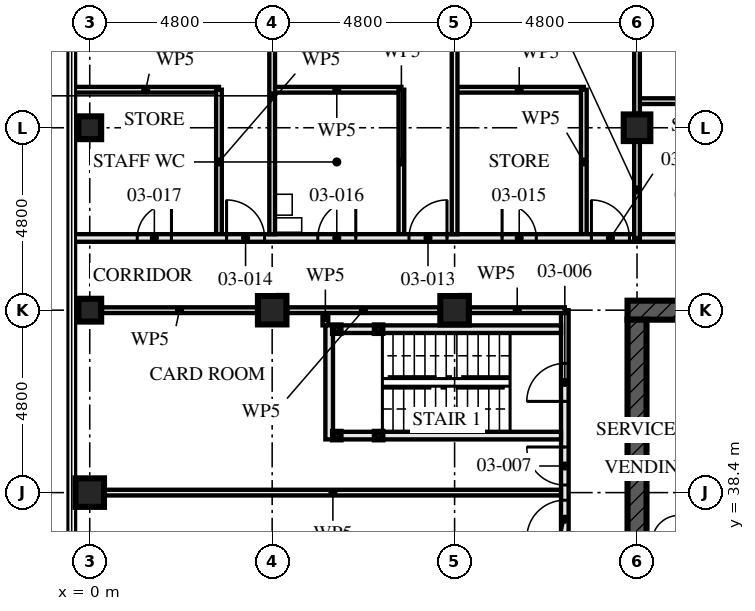
"""IFC4 building model, lengths in metres.
Left out: names, types, materials, properties, quantities, classifications, styles, units other than length and angle.
Written with IfcOpenShell. Run it as: python <this file> out.ifc"""

import sys

from ifc_helpers import new_model, si_unit, direction, frame, frame_2d, origin, origin_2d, place, context, subcontext, project, spatial, rectangle, hollow_rectangle, extrude, element, fill, save


model = new_model("IFC4")
c1 = context("Model", 3, precision=1e-05, world=origin(), true_north=direction((0.0, 1.0)))
c2 = subcontext(c1, "Body", "Model", "MODEL_VIEW")
j1 = project(units=[si_unit("LENGTHUNIT", "METRE"), si_unit("PLANEANGLEUNIT", "RADIAN")], contexts=[c1])
p1 = place(None, origin())
s1 = spatial("IfcSite", under=j1, at=p1, CompositionType="ELEMENT")
p2 = place(p1, origin())
s2 = spatial("IfcBuilding", under=s1, at=p2, CompositionType="ELEMENT")
p3 = place(p2, frame((0.0, 0.0, 13.5)))
s3 = spatial("IfcBuildingStorey", under=s2, at=p3, CompositionType="ELEMENT", Elevation=13.5)
p4 = place(p3, frame((0.0, 38.4, 0.0), z_axis=(0.0, 0.0, 1.0), x_axis=(1.0, 0.0, 0.0)))
e1 = element("IfcColumn", 1, at=p4, inside=s3, PredefinedType="COLUMN", context=c2, shape_type="SweptSolid", body=[
    extrude(hollow_rectangle(XDim=0.75, YDim=0.75, WallThickness=0.08, at=origin_2d()), origin(), (0.0, 0.0, 1.0), 4.5),
])
for number, where, z_axis, x_axis in (
    (2, (0.0, 43.2, 0.0), (0.0, 0.0, 1.0), (0.0, 1.0, 0.0)),
    (3, (0.0, 48.0, 0.0), (0.0, 0.0, 1.0), (1.0, 0.0, 0.0)),
):
    element("IfcColumn", number, at=place(p3, frame(where, z_axis=z_axis, x_axis=x_axis)), inside=s3, PredefinedType="COLUMN", context=c2, shape_type="SweptSolid", body=[
        extrude(hollow_rectangle(XDim=0.6, YDim=0.6, WallThickness=0.08, at=origin_2d()), origin(), (0.0, 0.0, 1.0), 4.5),
    ])
for number, where, z_axis, x_axis in (
    (4, (4.8, 43.2, 0.0), (0.0, 0.0, 1.0), (0.0, 1.0, 0.0)),
    (5, (9.6, 43.2, 0.0), (0.0, 0.0, 1.0), (0.0, 1.0, 0.0)),
):
    element("IfcColumn", number, at=place(p3, frame(where, z_axis=z_axis, x_axis=x_axis)), inside=s3, PredefinedType="COLUMN", context=c2, shape_type="SweptSolid", body=[
        extrude(hollow_rectangle(XDim=0.75, YDim=0.75, WallThickness=0.08, at=origin_2d()), origin(), (0.0, 0.0, 1.0), 4.5),
    ])
p5 = place(p3, frame((14.4, 48.0, 0.0), z_axis=(0.0, 0.0, 1.0), x_axis=(1.0, 0.0, 0.0)))
e6 = element("IfcColumn", 6, at=p5, inside=s3, PredefinedType="COLUMN", context=c2, shape_type="SweptSolid", body=[
    extrude(hollow_rectangle(XDim=0.7, YDim=0.7, WallThickness=0.06, at=origin_2d()), origin(), (0.0, 0.0, 1.0), 4.5),
])
p6 = place(p3, frame((29.05, 43.2, -0.17), z_axis=(0.0, 0.0, 1.0), x_axis=(-1.0, 0.0, 0.0)))
e7 = element("IfcWall", 7, at=p6, inside=s3, PredefinedType="SHEAR", context=c2, shape_type="SweptSolid", body=[
    extrude(rectangle(XDim=14.9, YDim=0.5, at=frame_2d((7.45, 0.0))), origin(), (0.0, 0.0, 1.0), 4.5),
])
p7 = place(p6, frame((6.85, 0.0, 0.17)))
e8 = element("IfcOpeningElement", 8, at=p7, cuts=e7, PredefinedType="OPENING", context=c2, shape_type="SweptSolid", body=[
    extrude(rectangle(XDim=1.2, YDim=2.1, at=frame_2d((0.6, 1.05))), frame((0.0, 0.26, 0.0), z_axis=(0.0, -1.0, 0.0), x_axis=(1.0, 0.0, 0.0)), (0.0, 0.0, 1.0), 0.521),
])
p8 = place(p3, frame((14.4, 42.95, -0.17), z_axis=(0.0, 0.0, 1.0), x_axis=(0.0, -1.0, 0.0)))
e9 = element("IfcWall", 9, at=p8, inside=s3, PredefinedType="SHEAR", context=c2, shape_type="SweptSolid", body=[
    extrude(rectangle(XDim=13.9, YDim=0.5, at=frame_2d((6.95, 0.0))), origin(), (0.0, 0.0, 1.0), 4.5),
])
p9 = place(p8, frame((6.35, 0.0, 0.17)))
e10 = element("IfcOpeningElement", 10, at=p9, cuts=e9, PredefinedType="OPENING", context=c2, shape_type="SweptSolid", body=[
    extrude(rectangle(XDim=1.2, YDim=2.1, at=frame_2d((0.6, 1.05))), frame((0.0, 0.26, 0.0), z_axis=(0.0, -1.0, 0.0), x_axis=(1.0, 0.0, 0.0)), (0.0, 0.0, 1.0), 0.521),
])
for number, where, z_axis, x_axis in (
    (11, (6.5, 42.7, 0.0), (0.0, 0.0, 1.0), (1.0, 0.0, 0.0)),
    (12, (6.5, 39.9, 0.0), (0.0, 0.0, 1.0), (1.0, 0.0, 0.0)),
    (13, (7.6, 42.7, 0.0), (0.0, 0.0, 1.0), (1.0, 0.0, 0.0)),
    (14, (7.6, 39.9, 0.0), (0.0, 0.0, 1.0), (1.0, 0.0, 0.0)),
):
    element("IfcColumn", number, at=place(p3, frame(where, z_axis=z_axis, x_axis=x_axis)), inside=s3, PredefinedType="COLUMN", context=c2, shape_type="SweptSolid", body=[
        extrude(hollow_rectangle(XDim=0.2, YDim=0.2, WallThickness=0.008, at=origin_2d()), origin(), (0.0, 0.0, 1.0), 4.33),
    ])
p10 = place(p3, frame((6.6, 42.7, 0.0), z_axis=(0.0, 0.0, 1.0), x_axis=(1.0, 0.0, 0.0)))
e15 = element("IfcWall", 15, at=p10, inside=s3, PredefinedType="SOLIDWALL", context=c2, shape_type="SweptSolid", body=[
    extrude(rectangle(XDim=0.9, YDim=0.2, at=frame_2d((0.45, 0.0))), origin(), (0.0, 0.0, 1.0), 3.99),
])
p11 = place(p3, frame((7.7, 42.7, 0.0), z_axis=(0.0, 0.0, 1.0), x_axis=(1.0, 0.0, 0.0)))
e16 = element("IfcWall", 16, at=p11, inside=s3, PredefinedType="SOLIDWALL", context=c2, shape_type="SweptSolid", body=[
    extrude(rectangle(XDim=4.7, YDim=0.2, at=frame_2d((2.35, 0.0))), origin(), (0.0, 0.0, 1.0), 3.99),
])
p12 = place(p3, frame((6.6, 39.9, 0.0), z_axis=(0.0, 0.0, 1.0), x_axis=(1.0, 0.0, 0.0)))
e17 = element("IfcWall", 17, at=p12, inside=s3, PredefinedType="SOLIDWALL", context=c2, shape_type="SweptSolid", body=[
    extrude(rectangle(XDim=0.9, YDim=0.2, at=frame_2d((0.45, 0.0))), origin(), (0.0, 0.0, 1.0), 3.99),
])
p13 = place(p3, frame((7.7, 39.9, 0.0), z_axis=(0.0, 0.0, 1.0), x_axis=(1.0, 0.0, 0.0)))
e18 = element("IfcWall", 18, at=p13, inside=s3, PredefinedType="SOLIDWALL", context=c2, shape_type="SweptSolid", body=[
    extrude(rectangle(XDim=4.7, YDim=0.2, at=frame_2d((2.35, 0.0))), origin(), (0.0, 0.0, 1.0), 3.99),
])
p14 = place(p3, frame((6.3, 42.8, 0.0), z_axis=(0.0, 0.0, 1.0), x_axis=(0.0, -1.0, 0.0)))
e19 = element("IfcWall", 19, at=p14, inside=s3, PredefinedType="SOLIDWALL", context=c2, shape_type="SweptSolid", body=[
    extrude(rectangle(XDim=3.0, YDim=0.2, at=frame_2d((1.5, 0.0))), origin(), (0.0, 0.0, 1.0), 4.33),
])
p15 = place(p3, frame((0.395, 38.4, 0.0), z_axis=(0.0, 0.0, 1.0), x_axis=(1.0, 0.0, 0.0)))
e20 = element("IfcWall", 20, at=p15, inside=s3, PredefinedType="PARTITIONING", context=c2, shape_type="SweptSolid", body=[
    extrude(rectangle(XDim=12.005, YDim=0.15, at=frame_2d((6.002, 0.0))), origin(), (0.0, 0.0, 1.0), 3.55),
])
p16 = place(p3, frame((6.2, 43.2, 0.0), z_axis=(0.0, 0.0, 1.0), x_axis=(0.0, -1.0, 0.0)))
e21 = element("IfcWall", 21, at=p16, inside=s3, PredefinedType="PARTITIONING", context=c2, shape_type="SweptSolid", body=[
    extrude(rectangle(XDim=0.4, YDim=0.15, at=frame_2d((0.2, 0.0))), origin(), (0.0, 0.0, 1.0), 4.33),
])
p17 = place(p3, frame((12.5, 43.2, 0.0), z_axis=(0.0, 0.0, 1.0), x_axis=(0.0, -1.0, 0.0)))
e22 = element("IfcWall", 22, at=p17, inside=s3, PredefinedType="PARTITIONING", context=c2, shape_type="SweptSolid", body=[
    extrude(rectangle(XDim=14.4, YDim=0.2, at=frame_2d((7.2, 0.0))), origin(), (0.0, 0.0, 1.0), 3.55),
])
p18 = place(p17, frame((1.4, 0.0, 0.0)))
e23 = element("IfcOpeningElement", 23, at=p18, cuts=e22, PredefinedType="OPENING", context=c2, shape_type="SweptSolid", body=[
    extrude(rectangle(XDim=1.0, YDim=2.1, at=frame_2d((0.5, 1.05))), frame((0.0, 0.111, 0.0), z_axis=(0.0, -1.0, 0.0), x_axis=(1.0, 0.0, 0.0)), (0.0, 0.0, 1.0), 0.221),
])
p19 = place(p17, frame((3.6, 0.0, 0.0)))
e24 = element("IfcOpeningElement", 24, at=p19, cuts=e22, PredefinedType="OPENING", context=c2, shape_type="SweptSolid", body=[
    extrude(rectangle(XDim=1.0, YDim=2.4, at=frame_2d((0.5, 1.2))), frame((0.0, 0.111, 0.0), z_axis=(0.0, -1.0, 0.0), x_axis=(1.0, 0.0, 0.0)), (0.0, 0.0, 1.0), 0.221),
])
p20 = place(p17, frame((5.0, 0.0, 0.0)))
e25 = element("IfcOpeningElement", 25, at=p20, cuts=e22, PredefinedType="OPENING", context=c2, shape_type="SweptSolid", body=[
    extrude(rectangle(XDim=1.0, YDim=2.4, at=frame_2d((0.5, 1.2))), frame((0.0, 0.111, 0.0), z_axis=(0.0, -1.0, 0.0), x_axis=(1.0, 0.0, 0.0)), (0.0, 0.0, 1.0), 0.221),
])
p21 = place(p17, frame((9.8, 0.0, 0.0)))
e26 = element("IfcOpeningElement", 26, at=p21, cuts=e22, PredefinedType="OPENING", context=c2, shape_type="SweptSolid", body=[
    extrude(rectangle(XDim=1.0, YDim=2.4, at=frame_2d((0.5, 1.2))), frame((0.0, 0.111, 0.0), z_axis=(0.0, -1.0, 0.0), x_axis=(1.0, 0.0, 0.0)), (0.0, 0.0, 1.0), 0.221),
])
p22 = place(p17, frame((7.45, 0.0, 0.0)))
e27 = element("IfcOpeningElement", 27, at=p22, cuts=e22, PredefinedType="OPENING", context=c2, shape_type="SweptSolid", body=[
    extrude(rectangle(XDim=0.9, YDim=2.1, at=frame_2d((0.45, 1.05))), frame((0.0, 0.111, 0.0), z_axis=(0.0, -1.0, 0.0), x_axis=(1.0, 0.0, 0.0)), (0.0, 0.0, 1.0), 0.221),
])
p23 = place(p17, frame((12.2, 0.0, 0.0)))
e28 = element("IfcOpeningElement", 28, at=p23, cuts=e22, PredefinedType="OPENING", context=c2, shape_type="SweptSolid", body=[
    extrude(rectangle(XDim=1.0, YDim=2.1, at=frame_2d((0.5, 1.05))), frame((0.0, 0.111, 0.0), z_axis=(0.0, -1.0, 0.0), x_axis=(1.0, 0.0, 0.0)), (0.0, 0.0, 1.0), 0.221),
])
p24 = place(p3, frame((13.0, 49.0, 0.0), z_axis=(0.0, 0.0, 1.0), x_axis=(0.0, -1.0, 0.0)))
e29 = element("IfcWall", 29, at=p24, inside=s3, PredefinedType="PARTITIONING", context=c2, shape_type="SweptSolid", body=[
    extrude(rectangle(XDim=3.8, YDim=0.15, at=frame_2d((1.9, 0.0))), origin(), (0.0, 0.0, 1.0), 3.55),
])
p25 = place(p3, frame((13.0, 49.0, 0.0), z_axis=(0.0, 0.0, 1.0), x_axis=(-1.0, 0.0, 0.0)))
e30 = element("IfcWall", 30, at=p25, inside=s3, PredefinedType="PARTITIONING", context=c2, shape_type="SweptSolid", body=[
    extrude(rectangle(XDim=3.4, YDim=0.15, at=frame_2d((1.7, 0.0))), origin(), (0.0, 0.0, 1.0), 4.33),
])
p26 = place(p3, frame((8.2, 49.0, 0.0), z_axis=(0.0, 0.0, 1.0), x_axis=(0.0, -1.0, 0.0)))
e31 = element("IfcWall", 31, at=p26, inside=s3, PredefinedType="PARTITIONING", context=c2, shape_type="SweptSolid", body=[
    extrude(rectangle(XDim=3.8, YDim=0.15, at=frame_2d((1.9, 0.0))), origin(), (0.0, 0.0, 1.0), 3.55),
])
p27 = place(p3, frame((8.2, 49.0, 0.0), z_axis=(0.0, 0.0, 1.0), x_axis=(-1.0, 0.0, 0.0)))
e32 = element("IfcWall", 32, at=p27, inside=s3, PredefinedType="PARTITIONING", context=c2, shape_type="SweptSolid", body=[
    extrude(rectangle(XDim=3.4, YDim=0.15, at=frame_2d((1.7, 0.0))), origin(), (0.0, 0.0, 1.0), 4.33),
])
p28 = place(p3, frame((3.4, 49.0, 0.0), z_axis=(0.0, 0.0, 1.0), x_axis=(0.0, -1.0, 0.0)))
e33 = element("IfcWall", 33, at=p28, inside=s3, PredefinedType="PARTITIONING", context=c2, shape_type="SweptSolid", body=[
    extrude(rectangle(XDim=3.8, YDim=0.15, at=frame_2d((1.9, 0.0))), origin(), (0.0, 0.0, 1.0), 3.55),
])
p29 = place(p3, frame((3.4, 49.0, 0.0), z_axis=(0.0, 0.0, 1.0), x_axis=(-1.0, 0.0, 0.0)))
e34 = element("IfcWall", 34, at=p29, inside=s3, PredefinedType="PARTITIONING", context=c2, shape_type="SweptSolid", body=[
    extrude(rectangle(XDim=3.855, YDim=0.15, at=frame_2d((1.927, 0.0))), origin(), (0.0, 0.0, 1.0), 3.32),
])
p30 = place(p3, frame((9.6, 57.28, 0.0), z_axis=(0.0, 0.0, 1.0), x_axis=(0.0, -1.0, 0.0)))
e35 = element("IfcWall", 35, at=p30, inside=s3, PredefinedType="PARTITIONING", context=c2, shape_type="SweptSolid", body=[
    extrude(rectangle(XDim=12.08, YDim=0.15, at=frame_2d((6.04, 0.0))), origin(), (0.0, 0.0, 1.0), 3.55),
])
p31 = place(p3, frame((4.8, 52.48, 0.0), z_axis=(0.0, 0.0, 1.0), x_axis=(0.0, -1.0, 0.0)))
e36 = element("IfcWall", 36, at=p31, inside=s3, PredefinedType="PARTITIONING", context=c2, shape_type="SweptSolid", body=[
    extrude(rectangle(XDim=7.28, YDim=0.15, at=frame_2d((3.64, 0.0))), origin(), (0.0, 0.0, 1.0), 3.55),
])
p32 = place(p3, frame((14.4, 45.1, 0.0), z_axis=(0.0, 0.0, 1.0), x_axis=(-1.0, 0.0, 0.0)))
e37 = element("IfcWall", 37, at=p32, inside=s3, PredefinedType="PARTITIONING", context=c2, shape_type="SweptSolid", body=[
    extrude(rectangle(XDim=14.855, YDim=0.2, at=frame_2d((7.427, 0.0))), origin(), (0.0, 0.0, 1.0), 3.32),
])
p33 = place(p32, frame((0.2, 0.0, 0.0)))
e38 = element("IfcOpeningElement", 38, at=p33, cuts=e37, PredefinedType="OPENING", context=c2, shape_type="SweptSolid", body=[
    extrude(rectangle(XDim=1.0, YDim=2.4, at=frame_2d((0.5, 1.2))), frame((0.0, 0.111, 0.0), z_axis=(0.0, -1.0, 0.0), x_axis=(1.0, 0.0, 0.0)), (0.0, 0.0, 1.0), 0.221),
])
p34 = place(p32, frame((5.0, 0.0, 0.0)))
e39 = element("IfcOpeningElement", 39, at=p34, cuts=e37, PredefinedType="OPENING", context=c2, shape_type="SweptSolid", body=[
    extrude(rectangle(XDim=1.0, YDim=2.4, at=frame_2d((0.5, 1.2))), frame((0.0, 0.111, 0.0), z_axis=(0.0, -1.0, 0.0), x_axis=(1.0, 0.0, 0.0)), (0.0, 0.0, 1.0), 0.221),
])
p35 = place(p32, frame((9.8, 0.0, 0.0)))
e40 = element("IfcOpeningElement", 40, at=p35, cuts=e37, PredefinedType="OPENING", context=c2, shape_type="SweptSolid", body=[
    extrude(rectangle(XDim=1.0, YDim=2.4, at=frame_2d((0.5, 1.2))), frame((0.0, 0.111, 0.0), z_axis=(0.0, -1.0, 0.0), x_axis=(1.0, 0.0, 0.0)), (0.0, 0.0, 1.0), 0.221),
])
p36 = place(p32, frame((2.65, 0.0, 0.0)))
e41 = element("IfcOpeningElement", 41, at=p36, cuts=e37, PredefinedType="OPENING", context=c2, shape_type="SweptSolid", body=[
    extrude(rectangle(XDim=0.9, YDim=2.1, at=frame_2d((0.45, 1.05))), frame((0.0, 0.111, 0.0), z_axis=(0.0, -1.0, 0.0), x_axis=(1.0, 0.0, 0.0)), (0.0, 0.0, 1.0), 0.221),
])
p37 = place(p32, frame((7.4, 0.0, 0.0)))
e42 = element("IfcOpeningElement", 42, at=p37, cuts=e37, PredefinedType="OPENING", context=c2, shape_type="SweptSolid", body=[
    extrude(rectangle(XDim=1.0, YDim=2.1, at=frame_2d((0.5, 1.05))), frame((0.0, 0.111, 0.0), z_axis=(0.0, -1.0, 0.0), x_axis=(1.0, 0.0, 0.0)), (0.0, 0.0, 1.0), 0.221),
])
p38 = place(p32, frame((12.25, 0.0, 0.0)))
e43 = element("IfcOpeningElement", 43, at=p38, cuts=e37, PredefinedType="OPENING", context=c2, shape_type="SweptSolid", body=[
    extrude(rectangle(XDim=0.9, YDim=2.1, at=frame_2d((0.45, 1.05))), frame((0.0, 0.111, 0.0), z_axis=(0.0, -1.0, 0.0), x_axis=(1.0, 0.0, 0.0)), (0.0, 0.0, 1.0), 0.221),
])
p39 = place(p3, frame((17.8, 48.7, 0.0), z_axis=(0.0, 0.0, 1.0), x_axis=(-1.0, 0.0, 0.0)))
e44 = element("IfcWall", 44, at=p39, inside=s3, PredefinedType="PARTITIONING", context=c2, shape_type="SweptSolid", body=[
    extrude(rectangle(XDim=3.4, YDim=0.15, at=frame_2d((1.7, 0.0))), origin(), (0.0, 0.0, 1.0), 4.33),
])
p40 = place(p3, frame((28.8, 45.1, 0.0), z_axis=(0.0, 0.0, 1.0), x_axis=(-1.0, 0.0, 0.0)))
e45 = element("IfcWall", 45, at=p40, inside=s3, PredefinedType="PARTITIONING", context=c2, shape_type="SweptSolid", body=[
    extrude(rectangle(XDim=14.4, YDim=0.2, at=frame_2d((7.2, 0.0))), origin(), (0.0, 0.0, 1.0), 4.33),
])
p41 = place(p40, frame((0.2, 0.0, 0.0)))
e46 = element("IfcOpeningElement", 46, at=p41, cuts=e45, PredefinedType="OPENING", context=c2, shape_type="SweptSolid", body=[
    extrude(rectangle(XDim=1.0, YDim=2.4, at=frame_2d((0.5, 1.2))), frame((0.0, 0.111, 0.0), z_axis=(0.0, -1.0, 0.0), x_axis=(1.0, 0.0, 0.0)), (0.0, 0.0, 1.0), 0.221),
])
p42 = place(p40, frame((5.0, 0.0, 0.0)))
e47 = element("IfcOpeningElement", 47, at=p42, cuts=e45, PredefinedType="OPENING", context=c2, shape_type="SweptSolid", body=[
    extrude(rectangle(XDim=1.0, YDim=2.4, at=frame_2d((0.5, 1.2))), frame((0.0, 0.111, 0.0), z_axis=(0.0, -1.0, 0.0), x_axis=(1.0, 0.0, 0.0)), (0.0, 0.0, 1.0), 0.221),
])
p43 = place(p40, frame((9.8, 0.0, 0.0)))
e48 = element("IfcOpeningElement", 48, at=p43, cuts=e45, PredefinedType="OPENING", context=c2, shape_type="SweptSolid", body=[
    extrude(rectangle(XDim=1.0, YDim=2.4, at=frame_2d((0.5, 1.2))), frame((0.0, 0.111, 0.0), z_axis=(0.0, -1.0, 0.0), x_axis=(1.0, 0.0, 0.0)), (0.0, 0.0, 1.0), 0.221),
])
p44 = place(p40, frame((2.65, 0.0, 0.0)))
e49 = element("IfcOpeningElement", 49, at=p44, cuts=e45, PredefinedType="OPENING", context=c2, shape_type="SweptSolid", body=[
    extrude(rectangle(XDim=0.9, YDim=2.1, at=frame_2d((0.45, 1.05))), frame((0.0, 0.111, 0.0), z_axis=(0.0, -1.0, 0.0), x_axis=(1.0, 0.0, 0.0)), (0.0, 0.0, 1.0), 0.221),
])
p45 = place(p40, frame((7.4, 0.0, 0.0)))
e50 = element("IfcOpeningElement", 50, at=p45, cuts=e45, PredefinedType="OPENING", context=c2, shape_type="SweptSolid", body=[
    extrude(rectangle(XDim=1.0, YDim=2.1, at=frame_2d((0.5, 1.05))), frame((0.0, 0.111, 0.0), z_axis=(0.0, -1.0, 0.0), x_axis=(1.0, 0.0, 0.0)), (0.0, 0.0, 1.0), 0.221),
])
p46 = place(p40, frame((12.25, 0.0, 0.0)))
e51 = element("IfcOpeningElement", 51, at=p46, cuts=e45, PredefinedType="OPENING", context=c2, shape_type="SweptSolid", body=[
    extrude(rectangle(XDim=0.9, YDim=2.1, at=frame_2d((0.45, 1.05))), frame((0.0, 0.111, 0.0), z_axis=(0.0, -1.0, 0.0), x_axis=(1.0, 0.0, 0.0)), (0.0, 0.0, 1.0), 0.221),
])
p47 = place(p3, frame((12.5, 43.2, 0.0), z_axis=(0.0, 0.0, 1.0), x_axis=(-1.0, 0.0, 0.0)))
e52 = element("IfcWall", 52, at=p47, inside=s3, PredefinedType="PARTITIONING", context=c2, shape_type="SweptSolid", body=[
    extrude(rectangle(XDim=2.505, YDim=0.15, at=frame_2d((1.252, 0.0))), origin(), (0.0, 0.0, 1.0), 3.32),
])
p48 = place(p3, frame((9.205, 43.2, 0.0), z_axis=(0.0, 0.0, 1.0), x_axis=(-1.0, 0.0, 0.0)))
e53 = element("IfcWall", 53, at=p48, inside=s3, PredefinedType="PARTITIONING", context=c2, shape_type="SweptSolid", body=[
    extrude(rectangle(XDim=4.01, YDim=0.15, at=frame_2d((2.005, 0.0))), origin(), (0.0, 0.0, 1.0), 3.32),
])
p49 = place(p3, frame((4.405, 43.2, 0.0), z_axis=(0.0, 0.0, 1.0), x_axis=(-1.0, 0.0, 0.0)))
e54 = element("IfcWall", 54, at=p49, inside=s3, PredefinedType="PARTITIONING", context=c2, shape_type="SweptSolid", body=[
    extrude(rectangle(XDim=4.085, YDim=0.15, at=frame_2d((2.042, 0.0))), origin(), (0.0, 0.0, 1.0), 3.32),
])
p50 = place(p3, frame((14.4, 45.1, 0.0), z_axis=(0.0, 0.0, 1.0), x_axis=(0.0, 1.0, 0.0)))
e55 = element("IfcWall", 55, at=p50, inside=s3, PredefinedType="PARTITIONING", context=c2, shape_type="SweptSolid", body=[
    extrude(rectangle(XDim=2.53, YDim=0.15, at=frame_2d((1.265, 0.0))), origin(), (0.0, 0.0, 1.0), 3.32),
])
p51 = place(p3, frame((14.4, 48.37, 0.0), z_axis=(0.0, 0.0, 1.0), x_axis=(0.0, 1.0, 0.0)))
e56 = element("IfcWall", 56, at=p51, inside=s3, PredefinedType="PARTITIONING", context=c2, shape_type="SweptSolid", body=[
    extrude(rectangle(XDim=4.06, YDim=0.15, at=frame_2d((2.03, 0.0))), origin(), (0.0, 0.0, 1.0), 3.32),
])
p52 = place(p18, frame((1.0, 0.0, 0.0), z_axis=(0.0, 0.0, 1.0), x_axis=(-1.0, 0.0, 0.0)))
e57 = element("IfcDoor", 57, at=p52, inside=s3, OperationType="SINGLE_SWING_RIGHT", PredefinedType="DOOR", context=c2, shape_type="SweptSolid", body=[
    extrude(rectangle(XDim=1.0, YDim=2.1, at=frame_2d((0.5, 1.05))), frame((0.0, 0.032, 0.0), z_axis=(0.0, -1.0, 0.0), x_axis=(1.0, 0.0, 0.0)), (0.0, 0.0, 1.0), 0.064),
])
fill(e23, e57)
p53 = place(p19, frame((1.0, 0.0, 0.0), z_axis=(0.0, 0.0, 1.0), x_axis=(-1.0, 0.0, 0.0)))
e58 = element("IfcDoor", 58, at=p53, inside=s3, OperationType="SINGLE_SWING_LEFT", PredefinedType="DOOR", context=c2, shape_type="SweptSolid", body=[
    extrude(rectangle(XDim=1.0, YDim=2.4, at=frame_2d((0.5, 1.2))), frame((0.0, 0.027, 0.0), z_axis=(0.0, -1.0, 0.0), x_axis=(1.0, 0.0, 0.0)), (0.0, 0.0, 1.0), 0.054),
])
fill(e24, e58)
p54 = place(p20, frame((1.0, 0.0, 0.0), z_axis=(0.0, 0.0, 1.0), x_axis=(-1.0, 0.0, 0.0)))
e59 = element("IfcDoor", 59, at=p54, inside=s3, OperationType="SINGLE_SWING_RIGHT", PredefinedType="DOOR", context=c2, shape_type="SweptSolid", body=[
    extrude(rectangle(XDim=1.0, YDim=2.4, at=frame_2d((0.5, 1.2))), frame((0.0, 0.027, 0.0), z_axis=(0.0, -1.0, 0.0), x_axis=(1.0, 0.0, 0.0)), (0.0, 0.0, 1.0), 0.054),
])
fill(e25, e59)
p55 = place(p33, frame((1.0, 0.0, 0.0), z_axis=(0.0, 0.0, 1.0), x_axis=(-1.0, 0.0, 0.0)))
e60 = element("IfcDoor", 60, at=p55, inside=s3, OperationType="SINGLE_SWING_RIGHT", PredefinedType="DOOR", context=c2, shape_type="SweptSolid", body=[
    extrude(rectangle(XDim=1.0, YDim=2.4, at=frame_2d((0.5, 1.2))), frame((0.0, 0.027, 0.0), z_axis=(0.0, -1.0, 0.0), x_axis=(1.0, 0.0, 0.0)), (0.0, 0.0, 1.0), 0.054),
])
fill(e38, e60)
p56 = place(p34, frame((1.0, 0.0, 0.0), z_axis=(0.0, 0.0, 1.0), x_axis=(-1.0, 0.0, 0.0)))
e61 = element("IfcDoor", 61, at=p56, inside=s3, OperationType="SINGLE_SWING_LEFT", PredefinedType="DOOR", context=c2, shape_type="SweptSolid", body=[
    extrude(rectangle(XDim=1.0, YDim=2.4, at=frame_2d((0.5, 1.2))), frame((0.0, 0.027, 0.0), z_axis=(0.0, -1.0, 0.0), x_axis=(1.0, 0.0, 0.0)), (0.0, 0.0, 1.0), 0.054),
])
fill(e39, e61)
p57 = place(p35, frame((1.0, 0.0, 0.0), z_axis=(0.0, 0.0, 1.0), x_axis=(-1.0, 0.0, 0.0)))
e62 = element("IfcDoor", 62, at=p57, inside=s3, OperationType="SINGLE_SWING_RIGHT", PredefinedType="DOOR", context=c2, shape_type="SweptSolid", body=[
    extrude(rectangle(XDim=1.0, YDim=2.4, at=frame_2d((0.5, 1.2))), frame((0.0, 0.027, 0.0), z_axis=(0.0, -1.0, 0.0), x_axis=(1.0, 0.0, 0.0)), (0.0, 0.0, 1.0), 0.054),
])
fill(e40, e62)
p58 = place(p36, frame((0.9, 0.0, 0.0), z_axis=(0.0, 0.0, 1.0), x_axis=(-1.0, 0.0, 0.0)))
e63 = element("IfcDoor", 63, at=p58, inside=s3, OperationType="SINGLE_SWING_RIGHT", PredefinedType="DOOR", context=c2, shape_type="SweptSolid", body=[
    extrude(rectangle(XDim=0.9, YDim=2.1, at=frame_2d((0.45, 1.05))), frame((0.0, 0.027, 0.0), z_axis=(0.0, -1.0, 0.0), x_axis=(1.0, 0.0, 0.0)), (0.0, 0.0, 1.0), 0.054),
])
fill(e41, e63)
p59 = place(p37, frame((1.0, 0.0, 0.0), z_axis=(0.0, 0.0, 1.0), x_axis=(-1.0, 0.0, 0.0)))
e64 = element("IfcDoor", 64, at=p59, inside=s3, OperationType="SINGLE_SWING_LEFT", PredefinedType="DOOR", context=c2, shape_type="SweptSolid", body=[
    extrude(rectangle(XDim=1.0, YDim=2.1, at=frame_2d((0.5, 1.05))), frame((0.0, 0.027, 0.0), z_axis=(0.0, -1.0, 0.0), x_axis=(1.0, 0.0, 0.0)), (0.0, 0.0, 1.0), 0.054),
])
fill(e42, e64)
p60 = place(p38, frame((0.9, 0.0, 0.0), z_axis=(0.0, 0.0, 1.0), x_axis=(-1.0, 0.0, 0.0)))
e65 = element("IfcDoor", 65, at=p60, inside=s3, OperationType="SINGLE_SWING_LEFT", PredefinedType="DOOR", context=c2, shape_type="SweptSolid", body=[
    extrude(rectangle(XDim=0.9, YDim=2.1, at=frame_2d((0.45, 1.05))), frame((0.0, 0.027, 0.0), z_axis=(0.0, -1.0, 0.0), x_axis=(1.0, 0.0, 0.0)), (0.0, 0.0, 1.0), 0.054),
])
fill(e43, e65)
save(model, sys.argv[1])
